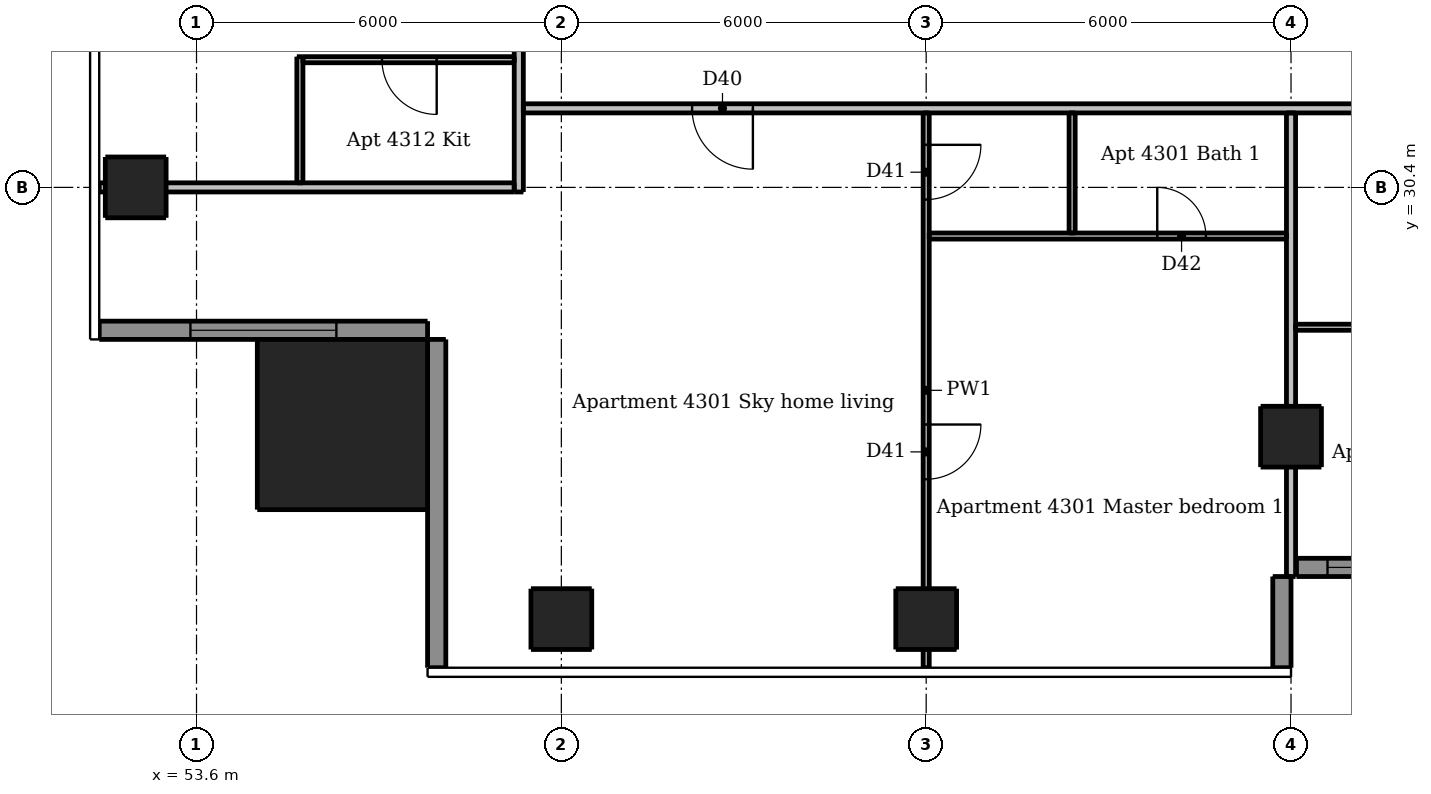
"""IFC4 building model, lengths in metres.
Left out: names, types, materials, properties, quantities, classifications, styles, units other than length and angle.
Written with IfcOpenShell. Run it as: python <this file> out.ifc"""

import sys

from ifc_helpers import new_model, si_unit, direction, frame, frame_2d, origin, origin_2d, place, context, subcontext, project, spatial, rectangle, extrude, element, fill, save


model = new_model("IFC4")
c1 = context("Model", 3, precision=1e-05, world=origin(), true_north=direction((0.0, 1.0)))
c2 = subcontext(c1, "Body", "Model", "MODEL_VIEW")
j1 = project(units=[si_unit("LENGTHUNIT", "METRE"), si_unit("PLANEANGLEUNIT", "RADIAN")], contexts=[c1])
p1 = place(None, origin())
s1 = spatial("IfcSite", under=j1, at=p1, CompositionType="ELEMENT")
p2 = place(p1, origin())
s2 = spatial("IfcBuilding", under=s1, at=p2, CompositionType="ELEMENT")
p3 = place(p2, frame((0.0, 0.0, 161.5)))
s3 = spatial("IfcBuildingStorey", under=s2, at=p3, CompositionType="ELEMENT", Elevation=161.5)
for number, where, z_axis, x_axis in (
    (1, (59.6, 23.3, 0.0), (0.0, 0.0, 1.0), (1.0, 0.0, 0.0)),
    (2, (65.6, 23.3, 0.0), (0.0, 0.0, 1.0), (1.0, 0.0, 0.0)),
    (3, (71.6, 26.3, 0.0), (0.0, 0.0, 1.0), (1.0, 0.0, 0.0)),
    (4, (52.6, 30.4, 0.0), (0.0, 0.0, 1.0), (1.0, 0.0, 0.0)),
):
    element("IfcColumn", number, at=place(p3, frame(where, z_axis=z_axis, x_axis=x_axis)), inside=s3, PredefinedType="COLUMN", context=c2, shape_type="SweptSolid", body=[
        extrude(rectangle(XDim=1.0, YDim=1.0, at=origin_2d()), origin(), (0.0, 0.0, 1.0), 3.05),
    ])
p4 = place(p3, frame((56.0, 26.5, 0.0), z_axis=(0.0, 0.0, 1.0), x_axis=(1.0, 0.0, 0.0)))
e5 = element("IfcColumn", 5, at=p4, inside=s3, PredefinedType="COLUMN", context=c2, shape_type="SweptSolid", body=[
    extrude(rectangle(XDim=2.8, YDim=2.8, at=origin_2d()), origin(), (0.0, 0.0, 1.0), 3.3),
])
p5 = place(p3, frame((71.45, 22.5, 0.0), z_axis=(0.0, 0.0, 1.0), x_axis=(0.0, 1.0, 0.0)))
e6 = element("IfcWall", 6, at=p5, inside=s3, PredefinedType="SOLIDWALL", context=c2, shape_type="SweptSolid", body=[
    extrude(rectangle(XDim=1.5, YDim=0.3, at=frame_2d((0.75, 0.0))), origin(), (0.0, 0.0, 1.0), 3.05),
])
p6 = place(p3, frame((52.0, 28.05, 0.0), z_axis=(0.0, 0.0, 1.0), x_axis=(1.0, 0.0, 0.0)))
e7 = element("IfcWall", 7, at=p6, inside=s3, PredefinedType="SOLIDWALL", context=c2, shape_type="SweptSolid", body=[
    extrude(rectangle(XDim=5.4, YDim=0.3, at=frame_2d((2.7, 0.0))), origin(), (0.0, 0.0, 1.0), 3.05),
])
p7 = place(p6, frame((1.5, 0.0, 0.15)))
e8 = element("IfcOpeningElement", 8, at=p7, cuts=e7, PredefinedType="OPENING", context=c2, shape_type="SweptSolid", body=[
    extrude(rectangle(XDim=2.4, YDim=2.1, at=frame_2d((1.2, 1.05))), frame((0.0, 0.16, 0.0), z_axis=(0.0, -1.0, 0.0), x_axis=(1.0, 0.0, 0.0)), (0.0, 0.0, 1.0), 0.32),
])
p8 = place(p3, frame((57.55, 27.9, 0.0), z_axis=(0.0, 0.0, 1.0), x_axis=(0.0, -1.0, 0.0)))
e9 = element("IfcWall", 9, at=p8, inside=s3, PredefinedType="SOLIDWALL", context=c2, shape_type="SweptSolid", body=[
    extrude(rectangle(XDim=5.4, YDim=0.3, at=frame_2d((2.7, 0.0))), origin(), (0.0, 0.0, 1.0), 3.05),
])
p9 = place(p3, frame((71.69, 24.15, 0.0), z_axis=(0.0, 0.0, 1.0), x_axis=(1.0, 0.0, 0.0)))
e10 = element("IfcWall", 10, at=p9, inside=s3, PredefinedType="SOLIDWALL", context=c2, shape_type="SweptSolid", body=[
    extrude(rectangle(XDim=5.91, YDim=0.3, at=frame_2d((2.955, 0.0))), origin(), (0.0, 0.0, 1.0), 3.05),
])
p10 = place(p9, frame((0.51, 0.0, 0.15)))
e11 = element("IfcOpeningElement", 11, at=p10, cuts=e10, PredefinedType="OPENING", context=c2, shape_type="SweptSolid", body=[
    extrude(rectangle(XDim=1.8, YDim=2.1, at=frame_2d((0.9, 1.05))), frame((0.0, 0.16, 0.0), z_axis=(0.0, -1.0, 0.0), x_axis=(1.0, 0.0, 0.0)), (0.0, 0.0, 1.0), 0.32),
])
p11 = place(p9, frame((3.51, 0.0, 0.15)))
e12 = element("IfcOpeningElement", 12, at=p11, cuts=e10, PredefinedType="OPENING", context=c2, shape_type="SweptSolid", body=[
    extrude(rectangle(XDim=1.8, YDim=2.1, at=frame_2d((0.9, 1.05))), frame((0.0, 0.16, 0.0), z_axis=(0.0, -1.0, 0.0), x_axis=(1.0, 0.0, 0.0)), (0.0, 0.0, 1.0), 0.32),
])
p12 = place(p3, frame((55.3, 30.475, 0.0), z_axis=(0.0, 0.0, 1.0), x_axis=(0.0, 1.0, 0.0)))
e13 = element("IfcWall", 13, at=p12, inside=s3, PredefinedType="PARTITIONING", context=c2, shape_type="SweptSolid", body=[
    extrude(rectangle(XDim=2.075, YDim=0.1, at=frame_2d((1.038, 0.0))), origin(), (0.0, 0.0, 1.0), 3.05),
])
p13 = place(p3, frame((65.6, 31.625, 0.0), z_axis=(0.0, 0.0, 1.0), x_axis=(0.0, -1.0, 0.0)))
e14 = element("IfcWall", 14, at=p13, inside=s3, PredefinedType="PARTITIONING", context=c2, shape_type="SweptSolid", body=[
    extrude(rectangle(XDim=9.125, YDim=0.1, at=frame_2d((4.562, 0.0))), origin(), (0.0, 0.0, 1.0), 2.516),
])
p14 = place(p13, frame((0.525, 0.0, 0.0)))
e15 = element("IfcOpeningElement", 15, at=p14, cuts=e14, PredefinedType="OPENING", context=c2, shape_type="SweptSolid", body=[
    extrude(rectangle(XDim=0.9, YDim=2.1, at=frame_2d((0.45, 1.05))), frame((0.0, 0.06, 0.0), z_axis=(0.0, -1.0, 0.0), x_axis=(1.0, 0.0, 0.0)), (0.0, 0.0, 1.0), 0.12),
])
p15 = place(p13, frame((5.125, 0.0, 0.0)))
e16 = element("IfcOpeningElement", 16, at=p15, cuts=e14, PredefinedType="OPENING", context=c2, shape_type="SweptSolid", body=[
    extrude(rectangle(XDim=0.9, YDim=2.1, at=frame_2d((0.45, 1.05))), frame((0.0, 0.06, 0.0), z_axis=(0.0, -1.0, 0.0), x_axis=(1.0, 0.0, 0.0)), (0.0, 0.0, 1.0), 0.12),
])
p16 = place(p3, frame((68.0, 29.65, 0.0), z_axis=(0.0, 0.0, 1.0), x_axis=(0.0, 1.0, 0.0)))
e17 = element("IfcWall", 17, at=p16, inside=s3, PredefinedType="PARTITIONING", context=c2, shape_type="SweptSolid", body=[
    extrude(rectangle(XDim=1.975, YDim=0.1, at=frame_2d((0.988, 0.0))), origin(), (0.0, 0.0, 1.0), 3.05),
])
p17 = place(p3, frame((58.825, 32.5, 0.0), z_axis=(0.0, 0.0, 1.0), x_axis=(-1.0, 0.0, 0.0)))
e18 = element("IfcWall", 18, at=p17, inside=s3, PredefinedType="PARTITIONING", context=c2, shape_type="SweptSolid", body=[
    extrude(rectangle(XDim=3.475, YDim=0.1, at=frame_2d((1.737, 0.0))), origin(), (0.0, 0.0, 1.0), 3.05),
])
p18 = place(p17, frame((1.275, 0.0, 0.0)))
e19 = element("IfcOpeningElement", 19, at=p18, cuts=e18, PredefinedType="OPENING", context=c2, shape_type="SweptSolid", body=[
    extrude(rectangle(XDim=0.9, YDim=2.1, at=frame_2d((0.45, 1.05))), frame((0.0, 0.06, 0.0), z_axis=(0.0, -1.0, 0.0), x_axis=(1.0, 0.0, 0.0)), (0.0, 0.0, 1.0), 0.12),
])
p19 = place(p3, frame((65.65, 29.6, 0.0), z_axis=(0.0, 0.0, 1.0), x_axis=(1.0, 0.0, 0.0)))
e20 = element("IfcWall", 20, at=p19, inside=s3, PredefinedType="PARTITIONING", context=c2, shape_type="SweptSolid", body=[
    extrude(rectangle(XDim=5.875, YDim=0.1, at=frame_2d((2.938, 0.0))), origin(), (0.0, 0.0, 1.0), 3.05),
])
p20 = place(p19, frame((3.75, 0.0, 0.0)))
e21 = element("IfcOpeningElement", 21, at=p20, cuts=e20, PredefinedType="OPENING", context=c2, shape_type="SweptSolid", body=[
    extrude(rectangle(XDim=0.8, YDim=2.1, at=frame_2d((0.4, 1.05))), frame((0.0, 0.06, 0.0), z_axis=(0.0, -1.0, 0.0), x_axis=(1.0, 0.0, 0.0)), (0.0, 0.0, 1.0), 0.12),
])
p21 = place(p3, frame((71.675, 28.1, 0.0), z_axis=(0.0, 0.0, 1.0), x_axis=(1.0, 0.0, 0.0)))
e22 = element("IfcWall", 22, at=p21, inside=s3, PredefinedType="PARTITIONING", context=c2, shape_type="SweptSolid", body=[
    extrude(rectangle(XDim=1.975, YDim=0.1, at=frame_2d((0.987, 0.0))), origin(), (0.0, 0.0, 1.0), 3.05),
])
p22 = place(p3, frame((58.9, 30.325, 0.0), z_axis=(0.0, 0.0, 1.0), x_axis=(0.0, 1.0, 0.0)))
e23 = element("IfcWall", 23, at=p22, inside=s3, PredefinedType="PARTITIONING", context=c2, shape_type="SweptSolid", body=[
    extrude(rectangle(XDim=30.85, YDim=0.15, at=frame_2d((15.425, 0.0))), origin(), (0.0, 0.0, 1.0), 3.05),
])
p23 = place(p22, frame((2.575, 0.0, 0.0)))
e24 = element("IfcOpeningElement", 24, at=p23, cuts=e23, PredefinedType="OPENING", context=c2, shape_type="SweptSolid", body=[
    extrude(rectangle(XDim=1.0, YDim=2.1, at=frame_2d((0.5, 1.05))), frame((0.0, 0.085, 0.0), z_axis=(0.0, -1.0, 0.0), x_axis=(1.0, 0.0, 0.0)), (0.0, 0.0, 1.0), 0.17),
])
p24 = place(p22, frame((8.575, 0.0, 0.0)))
e25 = element("IfcOpeningElement", 25, at=p24, cuts=e23, PredefinedType="OPENING", context=c2, shape_type="SweptSolid", body=[
    extrude(rectangle(XDim=1.0, YDim=2.1, at=frame_2d((0.5, 1.05))), frame((0.0, 0.085, 0.0), z_axis=(0.0, -1.0, 0.0), x_axis=(1.0, 0.0, 0.0)), (0.0, 0.0, 1.0), 0.17),
])
p25 = place(p22, frame((14.575, 0.0, 0.0)))
e26 = element("IfcOpeningElement", 26, at=p25, cuts=e23, PredefinedType="OPENING", context=c2, shape_type="SweptSolid", body=[
    extrude(rectangle(XDim=1.0, YDim=2.1, at=frame_2d((0.5, 1.05))), frame((0.0, 0.085, 0.0), z_axis=(0.0, -1.0, 0.0), x_axis=(1.0, 0.0, 0.0)), (0.0, 0.0, 1.0), 0.17),
])
p26 = place(p22, frame((26.925, 0.0, 0.0)))
e27 = element("IfcOpeningElement", 27, at=p26, cuts=e23, PredefinedType="OPENING", context=c2, shape_type="SweptSolid", body=[
    extrude(rectangle(XDim=1.0, YDim=2.1, at=frame_2d((0.5, 1.05))), frame((0.0, 0.085, 0.0), z_axis=(0.0, -1.0, 0.0), x_axis=(1.0, 0.0, 0.0)), (0.0, 0.0, 1.0), 0.17),
])
p27 = place(p3, frame((71.6, 24.0, 0.0), z_axis=(0.0, 0.0, 1.0), x_axis=(0.0, 1.0, 0.0)))
e28 = element("IfcWall", 28, at=p27, inside=s3, PredefinedType="PARTITIONING", context=c2, shape_type="SweptSolid", body=[
    extrude(rectangle(XDim=7.625, YDim=0.15, at=frame_2d((3.812, 0.0))), origin(), (0.0, 0.0, 1.0), 2.59),
])
p28 = place(p3, frame((89.525, 31.7, 0.0), z_axis=(0.0, 0.0, 1.0), x_axis=(-1.0, 0.0, 0.0)))
e29 = element("IfcWall", 29, at=p28, inside=s3, PredefinedType="PARTITIONING", context=c2, shape_type="SweptSolid", body=[
    extrude(rectangle(XDim=30.55, YDim=0.15, at=frame_2d((15.275, 0.0))), origin(), (0.0, 0.0, 1.0), 3.05),
])
p29 = place(p28, frame((26.775, 0.0, 0.0)))
e30 = element("IfcOpeningElement", 30, at=p29, cuts=e29, PredefinedType="OPENING", context=c2, shape_type="SweptSolid", body=[
    extrude(rectangle(XDim=1.0, YDim=2.1, at=frame_2d((0.5, 1.05))), frame((0.0, 0.085, 0.0), z_axis=(0.0, -1.0, 0.0), x_axis=(1.0, 0.0, 0.0)), (0.0, 0.0, 1.0), 0.17),
])
p30 = place(p28, frame((14.425, 0.0, 0.0)))
e31 = element("IfcOpeningElement", 31, at=p30, cuts=e29, PredefinedType="OPENING", context=c2, shape_type="SweptSolid", body=[
    extrude(rectangle(XDim=1.0, YDim=2.1, at=frame_2d((0.5, 1.05))), frame((0.0, 0.085, 0.0), z_axis=(0.0, -1.0, 0.0), x_axis=(1.0, 0.0, 0.0)), (0.0, 0.0, 1.0), 0.17),
])
p31 = place(p28, frame((6.575, 0.0, 0.0)))
e32 = element("IfcOpeningElement", 32, at=p31, cuts=e29, PredefinedType="OPENING", context=c2, shape_type="SweptSolid", body=[
    extrude(rectangle(XDim=1.0, YDim=2.1, at=frame_2d((0.5, 1.05))), frame((0.0, 0.085, 0.0), z_axis=(0.0, -1.0, 0.0), x_axis=(1.0, 0.0, 0.0)), (0.0, 0.0, 1.0), 0.17),
])
p32 = place(p3, frame((52.0, 30.4, 0.0), z_axis=(0.0, 0.0, 1.0), x_axis=(1.0, 0.0, 0.0)))
e33 = element("IfcWall", 33, at=p32, inside=s3, PredefinedType="PARTITIONING", context=c2, shape_type="SweptSolid", body=[
    extrude(rectangle(XDim=6.825, YDim=0.15, at=frame_2d((3.413, 0.0))), origin(), (0.0, 0.0, 1.0), 2.647),
])
p33 = place(p7, origin())
e34 = element("IfcWindow", 34, at=p33, inside=s3, PartitioningType="DOUBLE_PANEL_VERTICAL", PredefinedType="WINDOW", context=c2, shape_type="SweptSolid", body=[
    extrude(rectangle(XDim=2.4, YDim=2.1, at=frame_2d((1.2, 1.05))), frame((0.0, 0.03, 0.0), z_axis=(0.0, -1.0, 0.0), x_axis=(1.0, 0.0, 0.0)), (0.0, 0.0, 1.0), 0.06),
])
fill(e8, e34)
p34 = place(p10, origin())
e35 = element("IfcWindow", 35, at=p34, inside=s3, PartitioningType="DOUBLE_PANEL_VERTICAL", PredefinedType="WINDOW", context=c2, shape_type="SweptSolid", body=[
    extrude(rectangle(XDim=1.8, YDim=2.1, at=frame_2d((0.9, 1.05))), frame((0.0, 0.03, 0.0), z_axis=(0.0, -1.0, 0.0), x_axis=(1.0, 0.0, 0.0)), (0.0, 0.0, 1.0), 0.06),
])
fill(e11, e35)
p35 = place(p29, origin())
e36 = element("IfcDoor", 36, at=p35, inside=s3, OperationType="SINGLE_SWING_LEFT", PredefinedType="DOOR", context=c2, shape_type="SweptSolid", body=[
    extrude(rectangle(XDim=1.0, YDim=2.1, at=frame_2d((0.5, 1.05))), frame((0.0, 0.025, 0.0), z_axis=(0.0, -1.0, 0.0), x_axis=(1.0, 0.0, 0.0)), (0.0, 0.0, 1.0), 0.05),
])
fill(e30, e36)
p36 = place(p14, origin())
e37 = element("IfcDoor", 37, at=p36, inside=s3, OperationType="SINGLE_SWING_LEFT", PredefinedType="DOOR", context=c2, shape_type="SweptSolid", body=[
    extrude(rectangle(XDim=0.9, YDim=2.1, at=frame_2d((0.45, 1.05))), frame((0.0, 0.025, 0.0), z_axis=(0.0, -1.0, 0.0), x_axis=(1.0, 0.0, 0.0)), (0.0, 0.0, 1.0), 0.05),
])
fill(e15, e37)
p37 = place(p15, origin())
e38 = element("IfcDoor", 38, at=p37, inside=s3, OperationType="SINGLE_SWING_LEFT", PredefinedType="DOOR", context=c2, shape_type="SweptSolid", body=[
    extrude(rectangle(XDim=0.9, YDim=2.1, at=frame_2d((0.45, 1.05))), frame((0.0, 0.025, 0.0), z_axis=(0.0, -1.0, 0.0), x_axis=(1.0, 0.0, 0.0)), (0.0, 0.0, 1.0), 0.05),
])
fill(e16, e38)
p38 = place(p20, origin())
e39 = element("IfcDoor", 39, at=p38, inside=s3, OperationType="SINGLE_SWING_LEFT", PredefinedType="DOOR", context=c2, shape_type="SweptSolid", body=[
    extrude(rectangle(XDim=0.8, YDim=2.1, at=frame_2d((0.4, 1.05))), frame((0.0, 0.025, 0.0), z_axis=(0.0, -1.0, 0.0), x_axis=(1.0, 0.0, 0.0)), (0.0, 0.0, 1.0), 0.05),
])
fill(e21, e39)
p39 = place(p18, origin())
e40 = element("IfcDoor", 40, at=p39, inside=s3, OperationType="SINGLE_SWING_LEFT", PredefinedType="DOOR", context=c2, shape_type="SweptSolid", body=[
    extrude(rectangle(XDim=0.9, YDim=2.1, at=frame_2d((0.45, 1.05))), frame((0.0, 0.025, 0.0), z_axis=(0.0, -1.0, 0.0), x_axis=(1.0, 0.0, 0.0)), (0.0, 0.0, 1.0), 0.05),
])
fill(e19, e40)
save(model, sys.argv[1])
